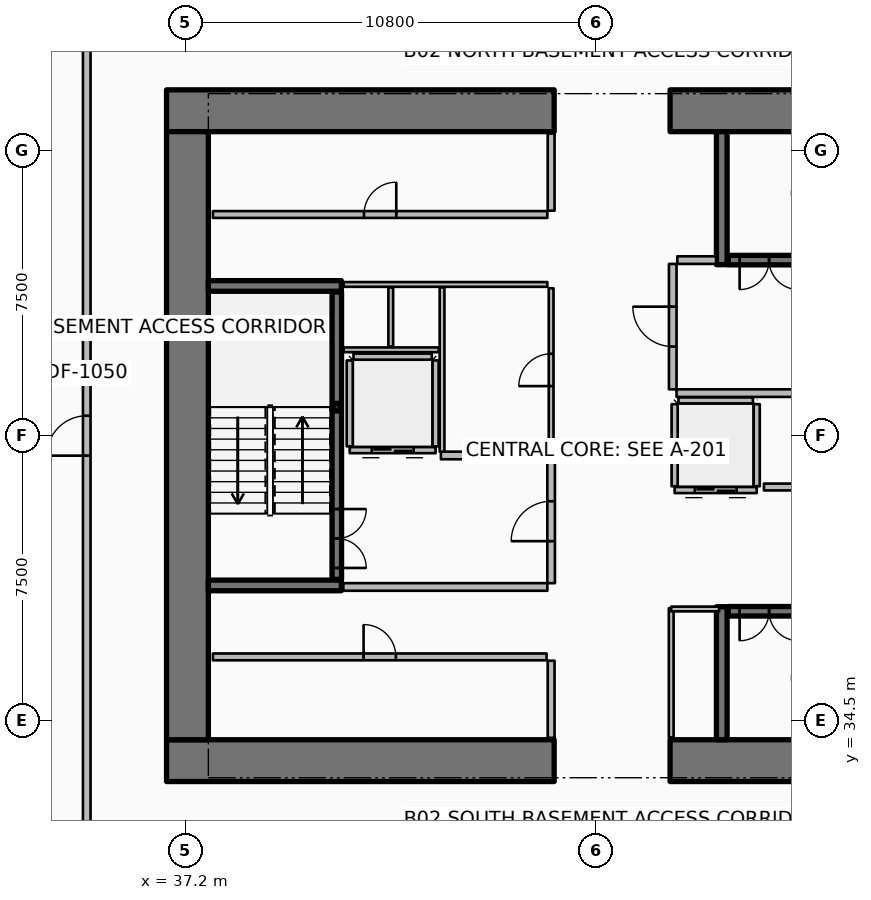
"""IFC4 building model, lengths in metres.
Left out: names, types, materials, properties, quantities, classifications, styles, units other than length and angle.
Written with IfcOpenShell. Run it as: python <this file> out.ifc"""

import sys

from ifc_helpers import new_model, si_unit, direction, frame, frame_2d, origin, origin_2d, place, context, subcontext, project, spatial, rectangle, hollow_rectangle, extrude, element, fill, save


model = new_model("IFC4")
c1 = context("Model", 3, precision=1e-05, world=origin(), true_north=direction((0.0, 1.0)))
c2 = subcontext(c1, "Body", "Model", "MODEL_VIEW")
j1 = project(units=[si_unit("LENGTHUNIT", "METRE"), si_unit("PLANEANGLEUNIT", "RADIAN")], contexts=[c1])
p1 = place(None, origin())
s1 = spatial("IfcSite", under=j1, at=p1, CompositionType="ELEMENT")
p2 = place(p1, origin())
s2 = spatial("IfcBuilding", under=s1, at=p2, CompositionType="ELEMENT")
p3 = place(p2, frame((0.0, 0.0, -7.6)))
s3 = spatial("IfcBuildingStorey", under=s2, at=p3, CompositionType="ELEMENT", Elevation=-7.6)
for number, where, z_axis, x_axis in (
    (1, (36.7, 33.45, 0.0), (0.0, 0.0, 1.0), (1.0, 0.0, 0.0)),
    (2, (49.95, 33.45, 0.0), (0.0, 0.0, 1.0), (1.0, 0.0, 0.0)),
    (3, (36.7, 50.55, 0.0), (0.0, 0.0, 1.0), (1.0, 0.0, 0.0)),
    (4, (49.95, 50.55, 0.0), (0.0, 0.0, 1.0), (1.0, 0.0, 0.0)),
):
    element("IfcWall", number, at=place(p3, frame(where, z_axis=z_axis, x_axis=x_axis)), inside=s3, PredefinedType="SHEAR", context=c2, shape_type="SweptSolid", body=[
        extrude(rectangle(XDim=10.2, YDim=1.1, at=frame_2d((5.1, 0.0))), origin(), (0.0, 0.0, 1.0), 3.8),
    ])
p4 = place(p3, frame((37.25, 34.0, 0.0), z_axis=(0.0, 0.0, 1.0), x_axis=(0.0, 1.0, 0.0)))
e5 = element("IfcWall", 5, at=p4, inside=s3, PredefinedType="SHEAR", context=c2, shape_type="SweptSolid", body=[
    extrude(rectangle(XDim=16.0, YDim=1.1, at=frame_2d((8.0, 0.0))), origin(), (0.0, 0.0, 1.0), 3.8),
])
for number, where, z_axis, x_axis in (
    (6, (37.8, 38.06, 0.0), (0.0, 0.0, 1.0), (1.0, 0.0, 0.0)),
    (7, (37.8, 45.94, 0.0), (0.0, 0.0, 1.0), (1.0, 0.0, 0.0)),
    (8, (51.31, 46.5, 0.0), (0.0, 0.0, 1.0), (0.0, 1.0, 0.0)),
    (9, (51.31, 34.0, 0.0), (0.0, 0.0, 1.0), (0.0, 1.0, 0.0)),
):
    element("IfcWall", number, at=place(p3, frame(where, z_axis=z_axis, x_axis=x_axis)), inside=s3, PredefinedType="SHEAR", context=c2, shape_type="SweptSolid", body=[
        extrude(rectangle(XDim=3.5, YDim=0.28, at=frame_2d((1.75, 0.0))), origin(), (0.0, 0.0, 1.0), 3.8),
    ])
p5 = place(p3, frame((41.18, 42.75, 0.0), z_axis=(0.0, 0.0, 1.0), x_axis=(1.0, 0.0, 0.0)))
e10 = element("IfcColumn", 10, at=p5, inside=s3, PredefinedType="COLUMN", context=c2, shape_type="SweptSolid", body=[
    extrude(hollow_rectangle(XDim=0.2, YDim=0.2, WallThickness=0.01, InnerFilletRadius=0.01, OuterFilletRadius=0.02, at=origin_2d()), origin(), (0.0, 0.0, 1.0), 1.695),
])
p6 = place(p3, frame((41.18, 38.22, 0.0), z_axis=(0.0, 0.0, 1.0), x_axis=(0.0, 1.0, 0.0)))
e11 = element("IfcWall", 11, at=p6, inside=s3, PredefinedType="SOLIDWALL", context=c2, shape_type="SweptSolid", body=[
    extrude(rectangle(XDim=7.56, YDim=0.25, at=frame_2d((3.78, 0.0))), origin(), (0.0, 0.0, 1.0), 3.52),
])
p7 = place(p6, frame((0.3, 0.0, 0.0)))
e12 = element("IfcOpeningElement", 12, at=p7, cuts=e11, PredefinedType="OPENING", context=c2, shape_type="SweptSolid", body=[
    extrude(rectangle(XDim=1.55, YDim=2.15, at=frame_2d((0.775, 1.075))), frame((0.0, 0.135, 0.0), z_axis=(0.0, -1.0, 0.0), x_axis=(1.0, 0.0, 0.0)), (0.0, 0.0, 1.0), 0.27),
])
p8 = place(p3, frame((51.48, 46.62, 0.0), z_axis=(0.0, 0.0, 1.0), x_axis=(1.0, 0.0, 0.0)))
e13 = element("IfcWall", 13, at=p8, inside=s3, PredefinedType="SOLIDWALL", context=c2, shape_type="SweptSolid", body=[
    extrude(rectangle(XDim=7.54, YDim=0.25, at=frame_2d((3.77, 0.0))), origin(), (0.0, 0.0, 1.0), 3.52),
])
p9 = place(p8, frame((0.3, 0.0, 0.0)))
e14 = element("IfcOpeningElement", 14, at=p9, cuts=e13, PredefinedType="OPENING", context=c2, shape_type="SweptSolid", body=[
    extrude(rectangle(XDim=1.55, YDim=2.15, at=frame_2d((0.775, 1.075))), frame((0.0, 0.135, 0.0), z_axis=(0.0, -1.0, 0.0), x_axis=(1.0, 0.0, 0.0)), (0.0, 0.0, 1.0), 0.27),
])
p10 = place(p3, frame((51.48, 37.38, 0.0), z_axis=(0.0, 0.0, 1.0), x_axis=(1.0, 0.0, 0.0)))
e15 = element("IfcWall", 15, at=p10, inside=s3, PredefinedType="SOLIDWALL", context=c2, shape_type="SweptSolid", body=[
    extrude(rectangle(XDim=7.54, YDim=0.25, at=frame_2d((3.77, 0.0))), origin(), (0.0, 0.0, 1.0), 3.52),
])
p11 = place(p10, frame((0.3, 0.0, 0.0)))
e16 = element("IfcOpeningElement", 16, at=p11, cuts=e15, PredefinedType="OPENING", context=c2, shape_type="SweptSolid", body=[
    extrude(rectangle(XDim=1.55, YDim=2.15, at=frame_2d((0.775, 1.075))), frame((0.0, 0.135, 0.0), z_axis=(0.0, -1.0, 0.0), x_axis=(1.0, 0.0, 0.0)), (0.0, 0.0, 1.0), 0.27),
])
p12 = place(p3, frame((43.78, 41.62, 0.0), z_axis=(0.0, 0.0, 1.0), x_axis=(-1.0, 0.0, 0.0)))
e17 = element("IfcWall", 17, at=p12, inside=s3, PredefinedType="PARTITIONING", context=c2, shape_type="SweptSolid", body=[
    extrude(rectangle(XDim=2.26, YDim=0.16, at=frame_2d((1.13, 0.0))), origin(), (0.0, 0.0, 1.0), 3.52),
])
p13 = place(p12, frame((0.58, 0.0, 0.0)))
e18 = element("IfcOpeningElement", 18, at=p13, cuts=e17, PredefinedType="OPENING", context=c2, shape_type="SweptSolid", body=[
    extrude(rectangle(XDim=1.1, YDim=2.1, at=frame_2d((0.55, 1.05))), frame((0.0, 0.09, 0.0), z_axis=(0.0, -1.0, 0.0), x_axis=(1.0, 0.0, 0.0)), (0.0, 0.0, 1.0), 0.18),
])
for number, where, z_axis, x_axis in (
    (19, (43.78, 41.72, 0.0), (0.0, 0.0, 1.0), (0.0, 1.0, 0.0)),
    (20, (41.52, 41.72, 0.0), (0.0, 0.0, 1.0), (0.0, 1.0, 0.0)),
):
    element("IfcWall", number, at=place(p3, frame(where, z_axis=z_axis, x_axis=x_axis)), inside=s3, PredefinedType="PARTITIONING", context=c2, shape_type="SweptSolid", body=[
        extrude(rectangle(XDim=2.26, YDim=0.16, at=frame_2d((1.13, 0.0))), origin(), (0.0, 0.0, 1.0), 3.52),
    ])
p14 = place(p3, frame((41.62, 44.08, 0.0), z_axis=(0.0, 0.0, 1.0), x_axis=(1.0, 0.0, 0.0)))
e21 = element("IfcWall", 21, at=p14, inside=s3, PredefinedType="PARTITIONING", context=c2, shape_type="SweptSolid", body=[
    extrude(rectangle(XDim=2.06, YDim=0.16, at=frame_2d((1.03, 0.0))), origin(), (0.0, 0.0, 1.0), 3.52),
])
p15 = place(p3, frame((52.23, 40.57, 0.0), z_axis=(0.0, 0.0, 1.0), x_axis=(-1.0, 0.0, 0.0)))
e22 = element("IfcWall", 22, at=p15, inside=s3, PredefinedType="PARTITIONING", context=c2, shape_type="SweptSolid", body=[
    extrude(rectangle(XDim=2.16, YDim=0.16, at=frame_2d((1.08, 0.0))), origin(), (0.0, 0.0, 1.0), 3.52),
])
p16 = place(p15, frame((0.53, 0.0, 0.0)))
e23 = element("IfcOpeningElement", 23, at=p16, cuts=e22, PredefinedType="OPENING", context=c2, shape_type="SweptSolid", body=[
    extrude(rectangle(XDim=1.1, YDim=2.1, at=frame_2d((0.55, 1.05))), frame((0.0, 0.09, 0.0), z_axis=(0.0, -1.0, 0.0), x_axis=(1.0, 0.0, 0.0)), (0.0, 0.0, 1.0), 0.18),
])
for number, where, z_axis, x_axis in (
    (24, (52.23, 40.67, 0.0), (0.0, 0.0, 1.0), (0.0, 1.0, 0.0)),
    (25, (50.07, 40.67, 0.0), (0.0, 0.0, 1.0), (0.0, 1.0, 0.0)),
):
    element("IfcWall", number, at=place(p3, frame(where, z_axis=z_axis, x_axis=x_axis)), inside=s3, PredefinedType="PARTITIONING", context=c2, shape_type="SweptSolid", body=[
        extrude(rectangle(XDim=2.16, YDim=0.16, at=frame_2d((1.08, 0.0))), origin(), (0.0, 0.0, 1.0), 3.52),
    ])
p17 = place(p3, frame((50.17, 42.93, 0.0), z_axis=(0.0, 0.0, 1.0), x_axis=(1.0, 0.0, 0.0)))
e26 = element("IfcWall", 26, at=p17, inside=s3, PredefinedType="PARTITIONING", context=c2, shape_type="SweptSolid", body=[
    extrude(rectangle(XDim=1.96, YDim=0.16, at=frame_2d((0.98, 0.0))), origin(), (0.0, 0.0, 1.0), 3.52),
])
p18 = place(p3, frame((37.92, 36.18, 0.0), z_axis=(0.0, 0.0, 1.0), x_axis=(1.0, 0.0, 0.0)))
e27 = element("IfcWall", 27, at=p18, inside=s3, PredefinedType="PARTITIONING", context=c2, shape_type="SweptSolid", body=[
    extrude(rectangle(XDim=8.78, YDim=0.18, at=frame_2d((4.39, 0.0))), origin(), (0.0, 0.0, 1.0), 3.52),
])
p19 = place(p18, frame((3.965, 0.0, 0.0)))
e28 = element("IfcOpeningElement", 28, at=p19, cuts=e27, PredefinedType="OPENING", context=c2, shape_type="SweptSolid", body=[
    extrude(rectangle(XDim=0.85, YDim=2.06, at=frame_2d((0.425, 1.03))), frame((0.0, 0.1, 0.0), z_axis=(0.0, -1.0, 0.0), x_axis=(1.0, 0.0, 0.0)), (0.0, 0.0, 1.0), 0.2),
])
p20 = place(p3, frame((46.82, 34.05, 0.0), z_axis=(0.0, 0.0, 1.0), x_axis=(0.0, 1.0, 0.0)))
e29 = element("IfcWall", 29, at=p20, inside=s3, PredefinedType="PARTITIONING", context=c2, shape_type="SweptSolid", body=[
    extrude(rectangle(XDim=2.03, YDim=0.18, at=frame_2d((1.015, 0.0))), origin(), (0.0, 0.0, 1.0), 3.52),
])
p21 = place(p3, frame((37.92, 47.82, 0.0), z_axis=(0.0, 0.0, 1.0), x_axis=(1.0, 0.0, 0.0)))
e30 = element("IfcWall", 30, at=p21, inside=s3, PredefinedType="PARTITIONING", context=c2, shape_type="SweptSolid", body=[
    extrude(rectangle(XDim=8.8, YDim=0.18, at=frame_2d((4.4, 0.0))), origin(), (0.0, 0.0, 1.0), 3.52),
])
p22 = place(p21, frame((3.975, 0.0, 0.0)))
e31 = element("IfcOpeningElement", 31, at=p22, cuts=e30, PredefinedType="OPENING", context=c2, shape_type="SweptSolid", body=[
    extrude(rectangle(XDim=0.85, YDim=2.06, at=frame_2d((0.425, 1.03))), frame((0.0, 0.1, 0.0), z_axis=(0.0, -1.0, 0.0), x_axis=(1.0, 0.0, 0.0)), (0.0, 0.0, 1.0), 0.2),
])
p23 = place(p3, frame((46.82, 47.92, 0.0), z_axis=(0.0, 0.0, 1.0), x_axis=(0.0, 1.0, 0.0)))
e32 = element("IfcWall", 32, at=p23, inside=s3, PredefinedType="PARTITIONING", context=c2, shape_type="SweptSolid", body=[
    extrude(rectangle(XDim=2.03, YDim=0.18, at=frame_2d((1.015, 0.0))), origin(), (0.0, 0.0, 1.0), 3.52),
])
p24 = place(p3, frame((52.42, 40.65, 0.0), z_axis=(0.0, 0.0, 1.0), x_axis=(1.0, 0.0, 0.0)))
e33 = element("IfcWall", 33, at=p24, inside=s3, PredefinedType="PARTITIONING", context=c2, shape_type="SweptSolid", body=[
    extrude(rectangle(XDim=6.5, YDim=0.18, at=frame_2d((3.25, 0.0))), origin(), (0.0, 0.0, 1.0), 3.52),
])
p25 = place(p24, frame((2.825, 0.0, 0.0)))
e34 = element("IfcOpeningElement", 34, at=p25, cuts=e33, PredefinedType="OPENING", context=c2, shape_type="SweptSolid", body=[
    extrude(rectangle(XDim=0.85, YDim=2.06, at=frame_2d((0.425, 1.03))), frame((0.0, 0.1, 0.0), z_axis=(0.0, -1.0, 0.0), x_axis=(1.0, 0.0, 0.0)), (0.0, 0.0, 1.0), 0.2),
])
p26 = place(p3, frame((41.35, 38.02, 0.0), z_axis=(0.0, 0.0, 1.0), x_axis=(1.0, 0.0, 0.0)))
e35 = element("IfcWall", 35, at=p26, inside=s3, PredefinedType="PARTITIONING", context=c2, shape_type="SweptSolid", body=[
    extrude(rectangle(XDim=5.37, YDim=0.2, at=frame_2d((2.685, 0.0))), origin(), (0.0, 0.0, 1.0), 3.52),
])
p27 = place(p3, frame((43.92, 41.48, 0.0), z_axis=(0.0, 0.0, 1.0), x_axis=(1.0, 0.0, 0.0)))
e36 = element("IfcWall", 36, at=p27, inside=s3, PredefinedType="PARTITIONING", context=c2, shape_type="SweptSolid", body=[
    extrude(rectangle(XDim=2.8, YDim=0.2, at=frame_2d((1.4, 0.0))), origin(), (0.0, 0.0, 1.0), 3.52),
])
p28 = place(p3, frame((46.82, 38.12, 0.0), z_axis=(0.0, 0.0, 1.0), x_axis=(0.0, 1.0, 0.0)))
e37 = element("IfcWall", 37, at=p28, inside=s3, PredefinedType="PARTITIONING", context=c2, shape_type="SweptSolid", body=[
    extrude(rectangle(XDim=3.26, YDim=0.2, at=frame_2d((1.63, 0.0))), origin(), (0.0, 0.0, 1.0), 3.52),
])
p29 = place(p28, frame((1.105, 0.0, 0.0)))
e38 = element("IfcOpeningElement", 38, at=p29, cuts=e37, PredefinedType="OPENING", context=c2, shape_type="SweptSolid", body=[
    extrude(rectangle(XDim=1.05, YDim=2.1, at=frame_2d((0.525, 1.05))), frame((0.0, 0.11, 0.0), z_axis=(0.0, -1.0, 0.0), x_axis=(1.0, 0.0, 0.0)), (0.0, 0.0, 1.0), 0.22),
])
p30 = place(p3, frame((50.12, 43.12, 0.0), z_axis=(0.0, 0.0, 1.0), x_axis=(1.0, 0.0, 0.0)))
e39 = element("IfcWall", 39, at=p30, inside=s3, PredefinedType="PARTITIONING", context=c2, shape_type="SweptSolid", body=[
    extrude(rectangle(XDim=8.88, YDim=0.2, at=frame_2d((4.44, 0.0))), origin(), (0.0, 0.0, 1.0), 3.52),
])
p31 = place(p3, frame((50.14, 46.62, 0.0), z_axis=(0.0, 0.0, 1.0), x_axis=(1.0, 0.0, 0.0)))
e40 = element("IfcWall", 40, at=p31, inside=s3, PredefinedType="PARTITIONING", context=c2, shape_type="SweptSolid", body=[
    extrude(rectangle(XDim=1.02, YDim=0.2, at=frame_2d((0.51, 0.0))), origin(), (0.0, 0.0, 1.0), 3.52),
])
p32 = place(p3, frame((50.02, 43.22, 0.0), z_axis=(0.0, 0.0, 1.0), x_axis=(0.0, 1.0, 0.0)))
e41 = element("IfcWall", 41, at=p32, inside=s3, PredefinedType="PARTITIONING", context=c2, shape_type="SweptSolid", body=[
    extrude(rectangle(XDim=3.3, YDim=0.2, at=frame_2d((1.65, 0.0))), origin(), (0.0, 0.0, 1.0), 3.52),
])
p33 = place(p32, frame((1.125, 0.0, 0.0)))
e42 = element("IfcOpeningElement", 42, at=p33, cuts=e41, PredefinedType="OPENING", context=c2, shape_type="SweptSolid", body=[
    extrude(rectangle(XDim=1.05, YDim=2.1, at=frame_2d((0.525, 1.05))), frame((0.0, 0.11, 0.0), z_axis=(0.0, -1.0, 0.0), x_axis=(1.0, 0.0, 0.0)), (0.0, 0.0, 1.0), 0.22),
])
p34 = place(p3, frame((41.36, 45.98, 0.0), z_axis=(0.0, 0.0, 1.0), x_axis=(1.0, 0.0, 0.0)))
e43 = element("IfcWall", 43, at=p34, inside=s3, PredefinedType="PARTITIONING", context=c2, shape_type="SweptSolid", body=[
    extrude(rectangle(XDim=5.36, YDim=0.125, at=frame_2d((2.68, 0.0))), origin(), (0.0, 0.0, 1.0), 2.96),
])
p35 = place(p3, frame((41.36, 44.26, 0.0), z_axis=(0.0, 0.0, 1.0), x_axis=(1.0, 0.0, 0.0)))
e44 = element("IfcWall", 44, at=p35, inside=s3, PredefinedType="PARTITIONING", context=c2, shape_type="SweptSolid", body=[
    extrude(rectangle(XDim=2.5, YDim=0.125, at=frame_2d((1.25, 0.0))), origin(), (0.0, 0.0, 1.0), 2.96),
])
p36 = place(p3, frame((42.6, 44.35, 0.0), z_axis=(0.0, 0.0, 1.0), x_axis=(0.0, 1.0, 0.0)))
e45 = element("IfcWall", 45, at=p36, inside=s3, PredefinedType="PARTITIONING", context=c2, shape_type="SweptSolid", body=[
    extrude(rectangle(XDim=1.55, YDim=0.125, at=frame_2d((0.775, 0.0))), origin(), (0.0, 0.0, 1.0), 2.96),
])
p37 = place(p3, frame((49.98, 34.06, 0.0), z_axis=(0.0, 0.0, 1.0), x_axis=(0.0, 1.0, 0.0)))
e46 = element("IfcWall", 46, at=p37, inside=s3, PredefinedType="PARTITIONING", context=c2, shape_type="SweptSolid", body=[
    extrude(rectangle(XDim=3.4, YDim=0.125, at=frame_2d((1.7, 0.0))), origin(), (0.0, 0.0, 1.0), 2.96),
])
p38 = place(p3, frame((49.98, 37.44, 0.0), z_axis=(0.0, 0.0, 1.0), x_axis=(1.0, 0.0, 0.0)))
e47 = element("IfcWall", 47, at=p38, inside=s3, PredefinedType="PARTITIONING", context=c2, shape_type="SweptSolid", body=[
    extrude(rectangle(XDim=1.26, YDim=0.125, at=frame_2d((0.63, 0.0))), origin(), (0.0, 0.0, 1.0), 2.96),
])
p39 = place(p3, frame((43.95, 41.58, 0.0), z_axis=(0.0, 0.0, 1.0), x_axis=(0.0, 1.0, 0.0)))
e48 = element("IfcWall", 48, at=p39, inside=s3, PredefinedType="PARTITIONING", context=c2, shape_type="SweptSolid", body=[
    extrude(rectangle(XDim=4.32, YDim=0.125, at=frame_2d((2.16, 0.0))), origin(), (0.0, 0.0, 1.0), 2.96),
])
p40 = place(p3, frame((46.82, 41.58, 0.0), z_axis=(0.0, 0.0, 1.0), x_axis=(0.0, 1.0, 0.0)))
e49 = element("IfcWall", 49, at=p40, inside=s3, PredefinedType="PARTITIONING", context=c2, shape_type="SweptSolid", body=[
    extrude(rectangle(XDim=4.3, YDim=0.125, at=frame_2d((2.15, 0.0))), origin(), (0.0, 0.0, 1.0), 2.96),
])
p41 = place(p40, frame((1.725, 0.0, 0.0)))
e50 = element("IfcOpeningElement", 50, at=p41, cuts=e49, PredefinedType="OPENING", context=c2, shape_type="SweptSolid", body=[
    extrude(rectangle(XDim=0.85, YDim=2.06, at=frame_2d((0.425, 1.03))), frame((0.0, 0.073, 0.0), z_axis=(0.0, -1.0, 0.0), x_axis=(1.0, 0.0, 0.0)), (0.0, 0.0, 1.0), 0.145),
])
p42 = place(p3, frame((34.6, 30.95, 0.0), z_axis=(0.0, 0.0, 1.0), x_axis=(0.0, 1.0, 0.0)))
e51 = element("IfcWall", 51, at=p42, inside=s3, PredefinedType="PARTITIONING", context=c2, shape_type="SweptSolid", body=[
    extrude(rectangle(XDim=22.1, YDim=0.2, at=frame_2d((11.05, 0.0))), origin(), (0.0, 0.0, 1.0), 2.811),
])
p43 = place(p42, frame((10.525, 0.0, 0.0)))
e52 = element("IfcOpeningElement", 52, at=p43, cuts=e51, PredefinedType="OPENING", context=c2, shape_type="SweptSolid", body=[
    extrude(rectangle(XDim=1.05, YDim=2.1, at=frame_2d((0.525, 1.05))), frame((0.0, 0.11, 0.0), z_axis=(0.0, -1.0, 0.0), x_axis=(1.0, 0.0, 0.0)), (0.0, 0.0, 1.0), 0.22),
])
p44 = place(p7, origin())
e53 = element("IfcDoor", 53, at=p44, inside=s3, OperationType="DOUBLE_DOOR_SINGLE_SWING", PredefinedType="DOOR", context=c2, shape_type="SweptSolid", body=[
    extrude(rectangle(XDim=1.55, YDim=2.15, at=frame_2d((0.775, 1.075))), frame((0.0, 0.025, 0.0), z_axis=(0.0, -1.0, 0.0), x_axis=(1.0, 0.0, 0.0)), (0.0, 0.0, 1.0), 0.05),
])
fill(e12, e53)
p45 = place(p9, origin())
e54 = element("IfcDoor", 54, at=p45, inside=s3, OperationType="DOUBLE_DOOR_SINGLE_SWING", PredefinedType="DOOR", context=c2, shape_type="SweptSolid", body=[
    extrude(rectangle(XDim=1.55, YDim=2.15, at=frame_2d((0.775, 1.075))), frame((0.0, 0.025, 0.0), z_axis=(0.0, -1.0, 0.0), x_axis=(1.0, 0.0, 0.0)), (0.0, 0.0, 1.0), 0.05),
])
fill(e14, e54)
p46 = place(p11, origin())
e55 = element("IfcDoor", 55, at=p46, inside=s3, OperationType="DOUBLE_DOOR_SINGLE_SWING", PredefinedType="DOOR", context=c2, shape_type="SweptSolid", body=[
    extrude(rectangle(XDim=1.55, YDim=2.15, at=frame_2d((0.775, 1.075))), frame((0.0, 0.025, 0.0), z_axis=(0.0, -1.0, 0.0), x_axis=(1.0, 0.0, 0.0)), (0.0, 0.0, 1.0), 0.05),
])
fill(e16, e55)
p47 = place(p13, origin())
e56 = element("IfcDoor", 56, at=p47, inside=s3, OperationType="DOUBLE_DOOR_SLIDING", PredefinedType="DOOR", context=c2, shape_type="SweptSolid", body=[
    extrude(rectangle(XDim=1.1, YDim=2.1, at=frame_2d((0.55, 1.05))), frame((0.0, 0.025, 0.0), z_axis=(0.0, -1.0, 0.0), x_axis=(1.0, 0.0, 0.0)), (0.0, 0.0, 1.0), 0.05),
])
fill(e18, e56)
p48 = place(p16, origin())
e57 = element("IfcDoor", 57, at=p48, inside=s3, OperationType="DOUBLE_DOOR_SLIDING", PredefinedType="DOOR", context=c2, shape_type="SweptSolid", body=[
    extrude(rectangle(XDim=1.1, YDim=2.1, at=frame_2d((0.55, 1.05))), frame((0.0, 0.025, 0.0), z_axis=(0.0, -1.0, 0.0), x_axis=(1.0, 0.0, 0.0)), (0.0, 0.0, 1.0), 0.05),
])
fill(e23, e57)
p49 = place(p19, origin())
e58 = element("IfcDoor", 58, at=p49, inside=s3, OperationType="SINGLE_SWING_LEFT", PredefinedType="DOOR", context=c2, shape_type="SweptSolid", body=[
    extrude(rectangle(XDim=0.85, YDim=2.06, at=frame_2d((0.425, 1.03))), frame((0.0, 0.025, 0.0), z_axis=(0.0, -1.0, 0.0), x_axis=(1.0, 0.0, 0.0)), (0.0, 0.0, 1.0), 0.05),
])
fill(e28, e58)
p50 = place(p22, origin())
e59 = element("IfcDoor", 59, at=p50, inside=s3, OperationType="SINGLE_SWING_RIGHT", PredefinedType="DOOR", context=c2, shape_type="SweptSolid", body=[
    extrude(rectangle(XDim=0.85, YDim=2.06, at=frame_2d((0.425, 1.03))), frame((0.0, 0.025, 0.0), z_axis=(0.0, -1.0, 0.0), x_axis=(1.0, 0.0, 0.0)), (0.0, 0.0, 1.0), 0.05),
])
fill(e31, e59)
p51 = place(p29, origin())
e60 = element("IfcDoor", 60, at=p51, inside=s3, OperationType="SINGLE_SWING_LEFT", PredefinedType="DOOR", context=c2, shape_type="SweptSolid", body=[
    extrude(rectangle(XDim=1.05, YDim=2.1, at=frame_2d((0.525, 1.05))), frame((0.0, 0.025, 0.0), z_axis=(0.0, -1.0, 0.0), x_axis=(1.0, 0.0, 0.0)), (0.0, 0.0, 1.0), 0.05),
])
fill(e38, e60)
p52 = place(p33, origin())
e61 = element("IfcDoor", 61, at=p52, inside=s3, OperationType="SINGLE_SWING_RIGHT", PredefinedType="DOOR", context=c2, shape_type="SweptSolid", body=[
    extrude(rectangle(XDim=1.05, YDim=2.1, at=frame_2d((0.525, 1.05))), frame((0.0, 0.025, 0.0), z_axis=(0.0, -1.0, 0.0), x_axis=(1.0, 0.0, 0.0)), (0.0, 0.0, 1.0), 0.05),
])
fill(e42, e61)
p53 = place(p41, origin())
e62 = element("IfcDoor", 62, at=p53, inside=s3, OperationType="SINGLE_SWING_LEFT", PredefinedType="DOOR", context=c2, shape_type="SweptSolid", body=[
    extrude(rectangle(XDim=0.85, YDim=2.06, at=frame_2d((0.425, 1.03))), frame((0.0, 0.025, 0.0), z_axis=(0.0, -1.0, 0.0), x_axis=(1.0, 0.0, 0.0)), (0.0, 0.0, 1.0), 0.05),
])
fill(e50, e62)
p54 = place(p43, origin())
e63 = element("IfcDoor", 63, at=p54, inside=s3, OperationType="SINGLE_SWING_LEFT", PredefinedType="DOOR", context=c2, shape_type="SweptSolid", body=[
    extrude(rectangle(XDim=1.05, YDim=2.1, at=frame_2d((0.525, 1.05))), frame((0.0, 0.025, 0.0), z_axis=(0.0, -1.0, 0.0), x_axis=(1.0, 0.0, 0.0)), (0.0, 0.0, 1.0), 0.05),
])
fill(e52, e63)
save(model, sys.argv[1])
